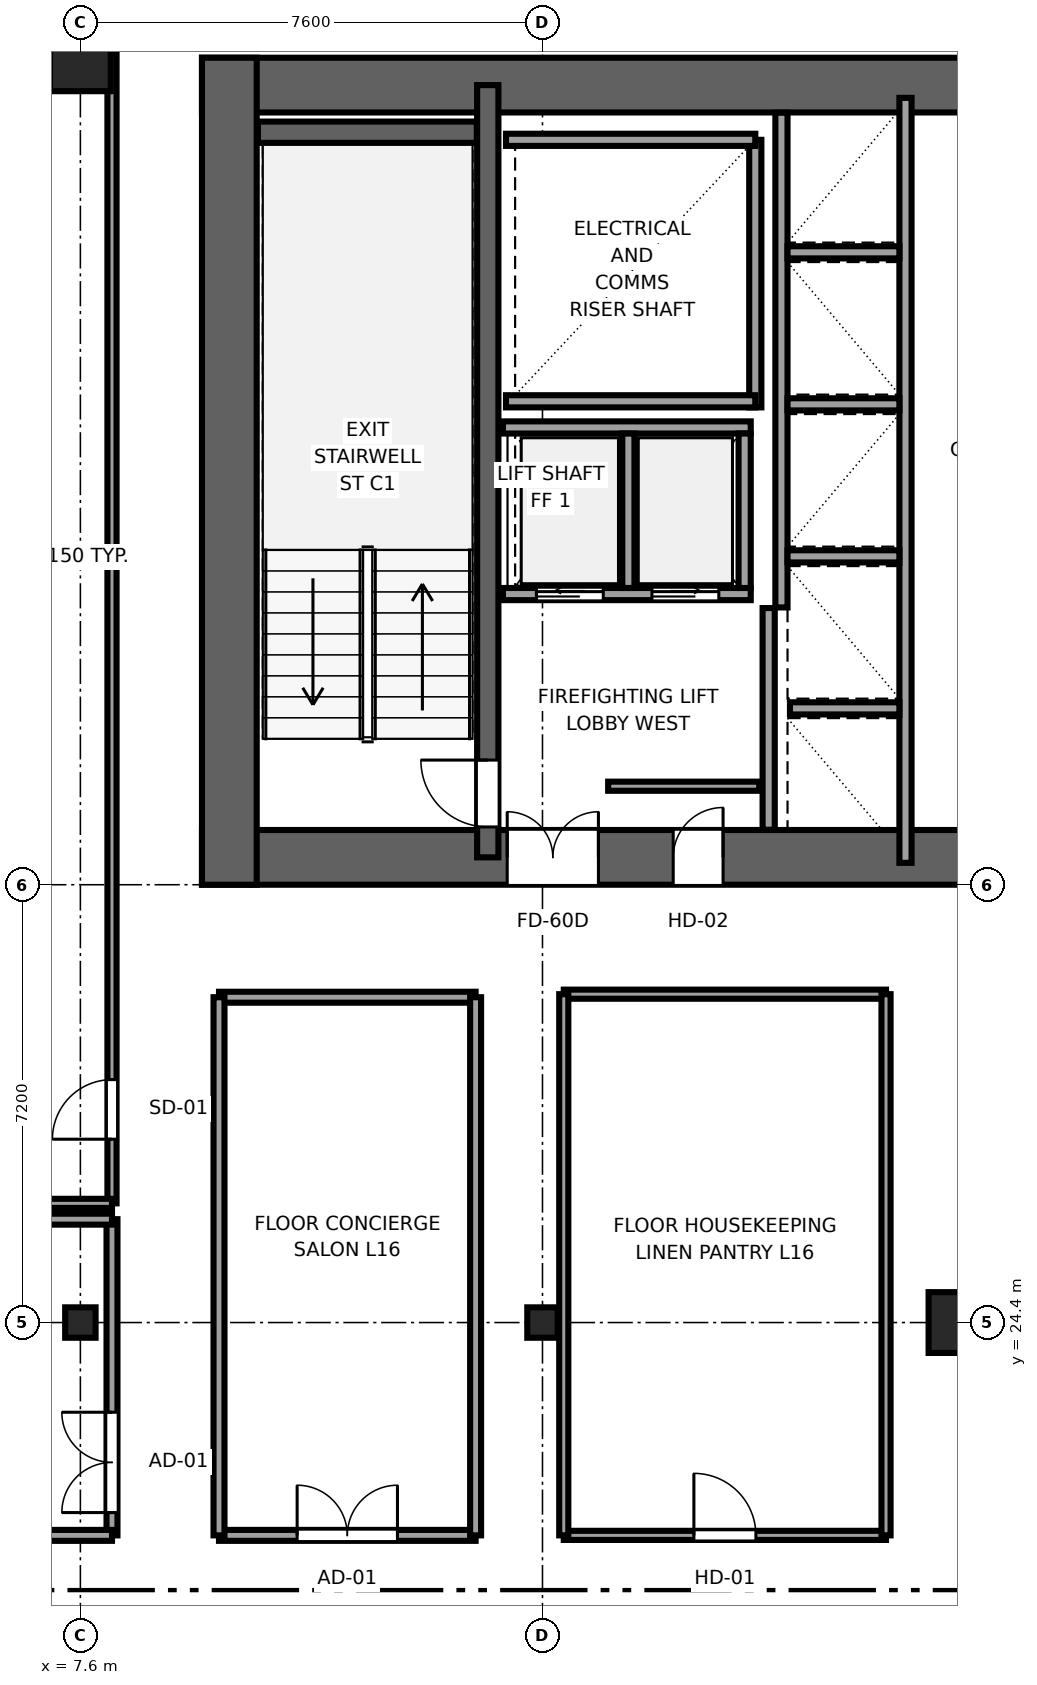
"""IFC4 building model, lengths in metres.
Left out: names, types, materials, properties, quantities, classifications, styles, units other than length and angle.
Written with IfcOpenShell. Run it as: python <this file> out.ifc"""

import sys

from ifc_helpers import new_model, si_unit, direction, frame, frame_2d, origin, origin_2d, place, context, subcontext, project, spatial, rectangle, i_section, extrude, source, transform, mapped, element, fill, save


model = new_model("IFC4")
c1 = context("Model", 3, precision=1e-05, world=origin(), true_north=direction((0.0, 1.0)))
c2 = subcontext(c1, "Body", "Model", "MODEL_VIEW")
j1 = project(units=[si_unit("LENGTHUNIT", "METRE"), si_unit("PLANEANGLEUNIT", "RADIAN")], contexts=[c1])
p1 = place(None, origin())
s1 = spatial("IfcSite", under=j1, at=p1, CompositionType="ELEMENT")
p2 = place(p1, origin())
s2 = spatial("IfcBuilding", under=s1, at=p2, CompositionType="ELEMENT")
p3 = place(p2, frame((0.0, 0.0, 67.5)))
s3 = spatial("IfcBuildingStorey", under=s2, at=p3, CompositionType="ELEMENT", Elevation=67.5)
p4 = place(p3, frame((9.6, 32.05, 0.0), z_axis=(0.0, 0.0, 1.0), x_axis=(1.0, 0.0, 0.0)))
e1 = element("IfcWall", 1, at=p4, inside=s3, PredefinedType="SHEAR", context=c2, shape_type="SweptSolid", body=[
    extrude(rectangle(XDim=26.8, YDim=0.9, at=frame_2d((13.4, 0.0))), origin(), (0.0, 0.0, 1.0), 3.55),
])
p5 = place(p4, frame((6.52, 0.0, 0.0), z_axis=(0.0, 0.0, 1.0), x_axis=(-1.0, 0.0, 0.0)))
e2 = element("IfcOpeningElement", 2, at=p5, cuts=e1, PredefinedType="OPENING", context=c2, shape_type="SweptSolid", body=[
    extrude(rectangle(XDim=1.5, YDim=2.04, at=frame_2d((0.75, 1.02))), frame((0.0, 0.46, 0.0), z_axis=(0.0, -1.0, 0.0), x_axis=(1.0, 0.0, 0.0)), (0.0, 0.0, 1.0), 0.92),
])
p6 = place(p4, frame((14.15, 0.0, 0.0), z_axis=(0.0, 0.0, 1.0), x_axis=(-1.0, 0.0, 0.0)))
e3 = element("IfcOpeningElement", 3, at=p6, cuts=e1, PredefinedType="OPENING", context=c2, shape_type="SweptSolid", body=[
    extrude(rectangle(XDim=1.5, YDim=2.04, at=frame_2d((0.75, 1.02))), frame((0.0, 0.46, 0.0), z_axis=(0.0, -1.0, 0.0), x_axis=(1.0, 0.0, 0.0)), (0.0, 0.0, 1.0), 0.92),
])
p7 = place(p4, frame((20.45, 0.0, 0.0), z_axis=(0.0, 0.0, 1.0), x_axis=(-1.0, 0.0, 0.0)))
e4 = element("IfcOpeningElement", 4, at=p7, cuts=e1, PredefinedType="OPENING", context=c2, shape_type="SweptSolid", body=[
    extrude(rectangle(XDim=1.5, YDim=2.04, at=frame_2d((0.75, 1.02))), frame((0.0, 0.46, 0.0), z_axis=(0.0, -1.0, 0.0), x_axis=(1.0, 0.0, 0.0)), (0.0, 0.0, 1.0), 0.92),
])
p8 = place(p4, frame((8.57, 0.0, 0.0), z_axis=(0.0, 0.0, 1.0), x_axis=(-1.0, 0.0, 0.0)))
e5 = element("IfcOpeningElement", 5, at=p8, cuts=e1, PredefinedType="OPENING", context=c2, shape_type="SweptSolid", body=[
    extrude(rectangle(XDim=0.82, YDim=2.01, at=frame_2d((0.41, 1.005))), frame((0.0, 0.46, 0.0), z_axis=(0.0, -1.0, 0.0), x_axis=(1.0, 0.0, 0.0)), (0.0, 0.0, 1.0), 0.92),
])
p9 = place(p3, frame((9.6, 44.75, 0.0), z_axis=(0.0, 0.0, 1.0), x_axis=(1.0, 0.0, 0.0)))
e6 = element("IfcWall", 6, at=p9, inside=s3, PredefinedType="SHEAR", context=c2, shape_type="SweptSolid", body=[
    extrude(rectangle(XDim=26.8, YDim=0.9, at=frame_2d((13.4, 0.0))), origin(), (0.0, 0.0, 1.0), 3.55),
])
p10 = place(p3, frame((10.05, 31.6, 0.0), z_axis=(0.0, 0.0, 1.0), x_axis=(0.0, 1.0, 0.0)))
e7 = element("IfcWall", 7, at=p10, inside=s3, PredefinedType="SHEAR", context=c2, shape_type="SweptSolid", body=[
    extrude(rectangle(XDim=13.6, YDim=0.9, at=frame_2d((6.8, 0.0))), origin(), (0.0, 0.0, 1.0), 3.55),
])
p11 = place(p3, frame((14.3, 32.05, 0.0), z_axis=(0.0, 0.0, 1.0), x_axis=(0.0, 1.0, 0.0)))
e8 = element("IfcWall", 8, at=p11, inside=s3, PredefinedType="SHEAR", context=c2, shape_type="SweptSolid", body=[
    extrude(rectangle(XDim=12.7, YDim=0.35, at=frame_2d((6.35, 0.0))), origin(), (0.0, 0.0, 1.0), 3.55),
])
p12 = place(p11, frame((0.5, 0.0, 0.0)))
e9 = element("IfcOpeningElement", 9, at=p12, cuts=e8, PredefinedType="OPENING", context=c2, shape_type="SweptSolid", body=[
    extrude(rectangle(XDim=1.1, YDim=2.12, at=frame_2d((0.55, 1.06))), frame((0.0, 0.185, 0.0), z_axis=(0.0, -1.0, 0.0), x_axis=(1.0, 0.0, 0.0)), (0.0, 0.0, 1.0), 0.37),
])
p13 = place(p3, frame((10.52, 43.975, 0.0), z_axis=(0.0, 0.0, 1.0), x_axis=(1.0, 0.0, 0.0)))
e10 = element("IfcWall", 10, at=p13, inside=s3, PredefinedType="SHEAR", context=c2, shape_type="SweptSolid", body=[
    extrude(rectangle(XDim=3.6, YDim=0.35, at=frame_2d((1.8, 0.0))), origin(), (0.0, 0.0, 1.0), 3.55),
])
m1 = source(origin(), c2, "Body", "SweptSolid", [
    extrude(i_section(OverallWidth=0.5, OverallDepth=0.5, WebThickness=0.028, FlangeThickness=0.045, at=origin_2d()), origin(), (0.0, 0.0, 1.0), 3.55),
])
for number, where, z_axis, x_axis in (
    (11, (7.6, 24.4, 0.0), (0.0, 0.0, 1.0), (1.0, 0.0, 0.0)),
    (12, (15.2, 24.4, 0.0), (0.0, 0.0, 1.0), (1.0, 0.0, 0.0)),
):
    element("IfcColumn", number, at=place(p3, frame(where, z_axis=z_axis, x_axis=x_axis)), inside=s3, PredefinedType="COLUMN", context=c2, shape_type="MappedRepresentation", body=[
        mapped(m1, transform((0.0, 0.0, 0.0), x_axis=(1.0, 0.0, 0.0), y_axis=(0.0, 1.0, 0.0), z_axis=(0.0, 0.0, 1.0), scale=1.0)),
    ])
m2 = source(origin(), c2, "Body", "SweptSolid", [
    extrude(rectangle(XDim=1.0, YDim=1.0, at=origin_2d()), origin(), (0.0, 0.0, 1.0), 3.55),
])
for number, where, z_axis, x_axis in (
    (13, (22.05, 24.4, 0.0), (0.0, 0.0, 1.0), (1.0, 0.0, 0.0)),
    (14, (7.6, 45.15, 0.0), (0.0, 0.0, 1.0), (1.0, 0.0, 0.0)),
):
    element("IfcColumn", number, at=place(p3, frame(where, z_axis=z_axis, x_axis=x_axis)), inside=s3, PredefinedType="COLUMN", context=c2, shape_type="MappedRepresentation", body=[
        mapped(m2, transform((0.0, 0.0, 0.0), x_axis=(1.0, 0.0, 0.0), y_axis=(0.0, 1.0, 0.0), z_axis=(0.0, 0.0, 1.0), scale=1.0)),
    ])
p14 = place(p3, frame((18.7, 39.45, 0.0), z_axis=(0.0, 0.0, 1.0), x_axis=(0.0, 1.0, 0.0)))
e15 = element("IfcWall", 15, at=p14, inside=s3, PredefinedType="SOLIDWALL", context=c2, shape_type="SweptSolid", body=[
    extrude(rectangle(XDim=4.4, YDim=0.2, at=frame_2d((2.2, 0.0))), origin(), (0.0, 0.0, 1.0), 3.37),
])
for number, where, z_axis, x_axis in (
    (16, (14.6, 39.55, 0.0), (0.0, 0.0, 1.0), (1.0, 0.0, 0.0)),
    (17, (14.6, 43.85, 0.0), (0.0, 0.0, 1.0), (1.0, 0.0, 0.0)),
):
    element("IfcWall", number, at=place(p3, frame(where, z_axis=z_axis, x_axis=x_axis)), inside=s3, PredefinedType="SOLIDWALL", context=c2, shape_type="SweptSolid", body=[
        extrude(rectangle(XDim=4.1, YDim=0.2, at=frame_2d((2.05, 0.0))), origin(), (0.0, 0.0, 1.0), 3.37),
    ])
p15 = place(p3, frame((18.92, 32.504, 0.0), z_axis=(0.0, 0.0, 1.0), x_axis=(0.0, 1.0, 0.0)))
e18 = element("IfcWall", 18, at=p15, inside=s3, PredefinedType="SOLIDWALL", context=c2, shape_type="SweptSolid", body=[
    extrude(rectangle(XDim=3.646, YDim=0.2, at=frame_2d((1.823, 0.0))), origin(), (0.0, 0.0, 1.0), 3.37),
])
p16 = place(p3, frame((21.17, 31.96, 0.0), z_axis=(0.0, 0.0, 1.0), x_axis=(0.0, 1.0, 0.0)))
e19 = element("IfcWall", 19, at=p16, inside=s3, PredefinedType="SOLIDWALL", context=c2, shape_type="SweptSolid", body=[
    extrude(rectangle(XDim=12.58, YDim=0.2, at=frame_2d((6.29, 0.0))), origin(), (0.0, 0.0, 1.0), 3.37),
])
p17 = place(p3, frame((19.13, 36.16, 0.0), z_axis=(0.0, 0.0, 1.0), x_axis=(0.0, 1.0, 0.0)))
e20 = element("IfcWall", 20, at=p17, inside=s3, PredefinedType="SOLIDWALL", context=c2, shape_type="SweptSolid", body=[
    extrude(rectangle(XDim=8.136, YDim=0.2, at=frame_2d((4.068, 0.0))), origin(), (0.0, 0.0, 1.0), 3.37),
])
p18 = place(p3, frame((19.27, 34.5, 0.0), z_axis=(0.0, 0.0, 1.0), x_axis=(1.0, 0.0, 0.0)))
e21 = element("IfcWall", 21, at=p18, inside=s3, PredefinedType="SOLIDWALL", context=c2, shape_type="SweptSolid", body=[
    extrude(rectangle(XDim=1.8, YDim=0.2, at=frame_2d((0.9, 0.0))), origin(), (0.0, 0.0, 1.0), 3.37),
])
for number, where, z_axis, x_axis in (
    (22, (19.23, 37.0, 0.0), (0.0, 0.0, 1.0), (1.0, 0.0, 0.0)),
    (23, (19.23, 39.5, 0.0), (0.0, 0.0, 1.0), (1.0, 0.0, 0.0)),
    (24, (19.23, 42.0, 0.0), (0.0, 0.0, 1.0), (1.0, 0.0, 0.0)),
):
    element("IfcWall", number, at=place(p3, frame(where, z_axis=z_axis, x_axis=x_axis)), inside=s3, PredefinedType="SOLIDWALL", context=c2, shape_type="SweptSolid", body=[
        extrude(rectangle(XDim=1.84, YDim=0.2, at=frame_2d((0.92, 0.0))), origin(), (0.0, 0.0, 1.0), 3.37),
    ])
p19 = place(p3, frame((14.55, 36.38, 0.0), z_axis=(0.0, 0.0, 1.0), x_axis=(1.0, 0.0, 0.0)))
e25 = element("IfcWall", 25, at=p19, inside=s3, PredefinedType="SOLIDWALL", context=c2, shape_type="SweptSolid", body=[
    extrude(rectangle(XDim=4.075, YDim=0.2, at=frame_2d((2.038, 0.0))), origin(), (0.0, 0.0, 1.0), 3.37),
])
p20 = place(p19, frame((0.55, 0.0, 0.0)))
e26 = element("IfcOpeningElement", 26, at=p20, cuts=e25, PredefinedType="OPENING", context=c2, shape_type="SweptSolid", body=[
    extrude(rectangle(XDim=1.1, YDim=2.12, at=frame_2d((0.55, 1.06))), frame((0.0, 0.11, 0.0), z_axis=(0.0, -1.0, 0.0), x_axis=(1.0, 0.0, 0.0)), (0.0, 0.0, 1.0), 0.22),
])
p21 = place(p19, frame((2.45, 0.0, 0.0)))
e27 = element("IfcOpeningElement", 27, at=p21, cuts=e25, PredefinedType="OPENING", context=c2, shape_type="SweptSolid", body=[
    extrude(rectangle(XDim=1.1, YDim=2.12, at=frame_2d((0.55, 1.06))), frame((0.0, 0.11, 0.0), z_axis=(0.0, -1.0, 0.0), x_axis=(1.0, 0.0, 0.0)), (0.0, 0.0, 1.0), 0.22),
])
p22 = place(p3, frame((14.55, 39.12, 0.0), z_axis=(0.0, 0.0, 1.0), x_axis=(1.0, 0.0, 0.0)))
e28 = element("IfcWall", 28, at=p22, inside=s3, PredefinedType="SOLIDWALL", context=c2, shape_type="SweptSolid", body=[
    extrude(rectangle(XDim=4.075, YDim=0.2, at=frame_2d((2.038, 0.0))), origin(), (0.0, 0.0, 1.0), 3.37),
])
for number, where, z_axis, x_axis in (
    (29, (18.525, 36.48, 0.0), (0.0, 0.0, 1.0), (0.0, 1.0, 0.0)),
    (30, (16.613, 36.48, 0.0), (0.0, 0.0, 1.0), (0.0, 1.0, 0.0)),
):
    element("IfcWall", number, at=place(p3, frame(where, z_axis=z_axis, x_axis=x_axis)), inside=s3, PredefinedType="SOLIDWALL", context=c2, shape_type="SweptSolid", body=[
        extrude(rectangle(XDim=2.54, YDim=0.2, at=frame_2d((1.27, 0.0))), origin(), (0.0, 0.0, 1.0), 3.37),
    ])
p23 = place(p3, frame((16.28, 33.22, 0.0), z_axis=(0.0, 0.0, 1.0), x_axis=(1.0, 0.0, 0.0)))
e31 = element("IfcWall", 31, at=p23, inside=s3, PredefinedType="PARTITIONING", context=c2, shape_type="SweptSolid", body=[
    extrude(rectangle(XDim=2.485, YDim=0.15, at=frame_2d((1.242, 0.0))), origin(), (0.0, 0.0, 1.0), 3.37),
])
p24 = place(p3, frame((8.12, 20.9, 0.0), z_axis=(0.0, 0.0, 1.0), x_axis=(0.0, 1.0, 0.0)))
e32 = element("IfcWall", 32, at=p24, inside=s3, PredefinedType="PARTITIONING", context=c2, shape_type="SweptSolid", body=[
    extrude(rectangle(XDim=5.2, YDim=0.18, at=frame_2d((2.6, 0.0))), origin(), (0.0, 0.0, 1.0), 3.37),
])
p25 = place(p24, frame((0.375, 0.0, 0.0)))
e33 = element("IfcOpeningElement", 33, at=p25, cuts=e32, PredefinedType="OPENING", context=c2, shape_type="SweptSolid", body=[
    extrude(rectangle(XDim=1.65, YDim=2.15, at=frame_2d((0.825, 1.075))), frame((0.0, 0.1, 0.0), z_axis=(0.0, -1.0, 0.0), x_axis=(1.0, 0.0, 0.0)), (0.0, 0.0, 1.0), 0.2),
])
for number, where, z_axis, x_axis in (
    (34, (0.405, 20.9, 0.0), (0.0, 0.0, 1.0), (1.0, 0.0, 0.0)),
    (35, (0.405, 26.1, 0.0), (0.0, 0.0, 1.0), (1.0, 0.0, 0.0)),
):
    element("IfcWall", number, at=place(p3, frame(where, z_axis=z_axis, x_axis=x_axis)), inside=s3, PredefinedType="PARTITIONING", context=c2, shape_type="SweptSolid", body=[
        extrude(rectangle(XDim=7.715, YDim=0.18, at=frame_2d((3.857, 0.0))), origin(), (0.0, 0.0, 1.0), 3.37),
    ])
p26 = place(p3, frame((8.12, 26.36, 0.0), z_axis=(0.0, 0.0, 1.0), x_axis=(0.0, 1.0, 0.0)))
e36 = element("IfcWall", 36, at=p26, inside=s3, PredefinedType="PARTITIONING", context=c2, shape_type="SweptSolid", body=[
    extrude(rectangle(XDim=19.235, YDim=0.15, at=frame_2d((9.617, 0.0))), origin(), (0.0, 0.0, 1.0), 3.37),
])
p27 = place(p26, frame((1.055, 0.0, 0.0)))
e37 = element("IfcOpeningElement", 37, at=p27, cuts=e36, PredefinedType="OPENING", context=c2, shape_type="SweptSolid", body=[
    extrude(rectangle(XDim=0.98, YDim=2.12, at=frame_2d((0.49, 1.06))), frame((0.0, 0.085, 0.0), z_axis=(0.0, -1.0, 0.0), x_axis=(1.0, 0.0, 0.0)), (0.0, 0.0, 1.0), 0.17),
])
p28 = place(p3, frame((2.77, 26.36, 0.0), z_axis=(0.0, 0.0, 1.0), x_axis=(1.0, 0.0, 0.0)))
e38 = element("IfcWall", 38, at=p28, inside=s3, PredefinedType="PARTITIONING", context=c2, shape_type="SweptSolid", body=[
    extrude(rectangle(XDim=5.35, YDim=0.15, at=frame_2d((2.675, 0.0))), origin(), (0.0, 0.0, 1.0), 3.37),
])
p29 = place(p3, frame((9.88, 20.9, 0.0), z_axis=(0.0, 0.0, 1.0), x_axis=(1.0, 0.0, 0.0)))
e39 = element("IfcWall", 39, at=p29, inside=s3, PredefinedType="PARTITIONING", context=c2, shape_type="SweptSolid", body=[
    extrude(rectangle(XDim=4.22, YDim=0.18, at=frame_2d((2.11, 0.0))), origin(), (0.0, 0.0, 1.0), 3.37),
])
p30 = place(p29, frame((1.285, 0.0, 0.0)))
e40 = element("IfcOpeningElement", 40, at=p30, cuts=e39, PredefinedType="OPENING", context=c2, shape_type="SweptSolid", body=[
    extrude(rectangle(XDim=1.65, YDim=2.15, at=frame_2d((0.825, 1.075))), frame((0.0, 0.1, 0.0), z_axis=(0.0, -1.0, 0.0), x_axis=(1.0, 0.0, 0.0)), (0.0, 0.0, 1.0), 0.2),
])
p31 = place(p3, frame((9.88, 29.75, 0.0), z_axis=(0.0, 0.0, 1.0), x_axis=(1.0, 0.0, 0.0)))
e41 = element("IfcWall", 41, at=p31, inside=s3, PredefinedType="PARTITIONING", context=c2, shape_type="SweptSolid", body=[
    extrude(rectangle(XDim=4.22, YDim=0.18, at=frame_2d((2.11, 0.0))), origin(), (0.0, 0.0, 1.0), 3.37),
])
for number, where, z_axis, x_axis in (
    (42, (9.88, 20.9, 0.0), (0.0, 0.0, 1.0), (0.0, 1.0, 0.0)),
    (43, (14.1, 20.9, 0.0), (0.0, 0.0, 1.0), (0.0, 1.0, 0.0)),
):
    element("IfcWall", number, at=place(p3, frame(where, z_axis=z_axis, x_axis=x_axis)), inside=s3, PredefinedType="PARTITIONING", context=c2, shape_type="SweptSolid", body=[
        extrude(rectangle(XDim=8.85, YDim=0.18, at=frame_2d((4.425, 0.0))), origin(), (0.0, 0.0, 1.0), 3.37),
    ])
p32 = place(p3, frame((15.55, 20.9, 0.0), z_axis=(0.0, 0.0, 1.0), x_axis=(1.0, 0.0, 0.0)))
e44 = element("IfcWall", 44, at=p32, inside=s3, PredefinedType="PARTITIONING", context=c2, shape_type="SweptSolid", body=[
    extrude(rectangle(XDim=5.3, YDim=0.15, at=frame_2d((2.65, 0.0))), origin(), (0.0, 0.0, 1.0), 3.37),
])
p33 = place(p32, frame((2.14, 0.0, 0.0)))
e45 = element("IfcOpeningElement", 45, at=p33, cuts=e44, PredefinedType="OPENING", context=c2, shape_type="SweptSolid", body=[
    extrude(rectangle(XDim=1.02, YDim=2.03, at=frame_2d((0.51, 1.015))), frame((0.0, 0.085, 0.0), z_axis=(0.0, -1.0, 0.0), x_axis=(1.0, 0.0, 0.0)), (0.0, 0.0, 1.0), 0.17),
])
p34 = place(p3, frame((15.55, 29.8, 0.0), z_axis=(0.0, 0.0, 1.0), x_axis=(1.0, 0.0, 0.0)))
e46 = element("IfcWall", 46, at=p34, inside=s3, PredefinedType="PARTITIONING", context=c2, shape_type="SweptSolid", body=[
    extrude(rectangle(XDim=5.3, YDim=0.15, at=frame_2d((2.65, 0.0))), origin(), (0.0, 0.0, 1.0), 3.37),
])
for number, where, z_axis, x_axis in (
    (47, (15.55, 20.9, 0.0), (0.0, 0.0, 1.0), (0.0, 1.0, 0.0)),
    (48, (20.85, 20.9, 0.0), (0.0, 0.0, 1.0), (0.0, 1.0, 0.0)),
):
    element("IfcWall", number, at=place(p3, frame(where, z_axis=z_axis, x_axis=x_axis)), inside=s3, PredefinedType="PARTITIONING", context=c2, shape_type="SweptSolid", body=[
        extrude(rectangle(XDim=8.9, YDim=0.15, at=frame_2d((4.45, 0.0))), origin(), (0.0, 0.0, 1.0), 3.37),
    ])
m3 = source(origin(), c2, "Body", "SweptSolid", [
    extrude(rectangle(XDim=1.1, YDim=2.12, at=frame_2d((0.55, 1.06))), frame((0.0, 0.025, 0.0), z_axis=(0.0, -1.0, 0.0), x_axis=(1.0, 0.0, 0.0)), (0.0, 0.0, 1.0), 0.05),
])
p35 = place(p12, origin())
e49 = element("IfcDoor", 49, at=p35, inside=s3, OperationType="SINGLE_SWING_RIGHT", PredefinedType="DOOR", context=c2, shape_type="MappedRepresentation", body=[
    mapped(m3, transform((0.0, 0.0, 0.0), x_axis=(1.0, 0.0, 0.0), y_axis=(0.0, 1.0, 0.0), z_axis=(0.0, 0.0, 1.0), scale=1.0)),
])
fill(e9, e49)
m4 = source(origin(), c2, "Body", "SweptSolid", [
    extrude(rectangle(XDim=1.5, YDim=2.04, at=frame_2d((0.75, 1.02))), frame((0.0, 0.025, 0.0), z_axis=(0.0, -1.0, 0.0), x_axis=(1.0, 0.0, 0.0)), (0.0, 0.0, 1.0), 0.05),
])
p36 = place(p5, origin())
e50 = element("IfcDoor", 50, at=p36, inside=s3, OperationType="DOUBLE_DOOR_SINGLE_SWING", PredefinedType="DOOR", context=c2, shape_type="MappedRepresentation", body=[
    mapped(m4, transform((0.0, 0.0, 0.0), x_axis=(1.0, 0.0, 0.0), y_axis=(0.0, 1.0, 0.0), z_axis=(0.0, 0.0, 1.0), scale=1.0)),
])
fill(e2, e50)
m5 = source(origin(), c2, "Body", "SweptSolid", [
    extrude(rectangle(XDim=0.82, YDim=2.01, at=frame_2d((0.41, 1.005))), frame((0.0, 0.025, 0.0), z_axis=(0.0, -1.0, 0.0), x_axis=(1.0, 0.0, 0.0)), (0.0, 0.0, 1.0), 0.05),
])
p37 = place(p8, origin())
e51 = element("IfcDoor", 51, at=p37, inside=s3, OperationType="SINGLE_SWING_RIGHT", PredefinedType="DOOR", context=c2, shape_type="MappedRepresentation", body=[
    mapped(m5, transform((0.0, 0.0, 0.0), x_axis=(1.0, 0.0, 0.0), y_axis=(0.0, 1.0, 0.0), z_axis=(0.0, 0.0, 1.0), scale=1.0)),
])
fill(e5, e51)
m6 = source(origin(), c2, "Body", "SweptSolid", [
    extrude(rectangle(XDim=1.1, YDim=2.12, at=frame_2d((0.55, 1.06))), frame((0.0, 0.025, 0.0), z_axis=(0.0, -1.0, 0.0), x_axis=(1.0, 0.0, 0.0)), (0.0, 0.0, 1.0), 0.05),
])
p38 = place(p20, origin())
e52 = element("IfcDoor", 52, at=p38, inside=s3, OperationType="SLIDING_TO_LEFT", PredefinedType="DOOR", context=c2, shape_type="MappedRepresentation", body=[
    mapped(m6, transform((0.0, 0.0, 0.0), x_axis=(1.0, 0.0, 0.0), y_axis=(0.0, 1.0, 0.0), z_axis=(0.0, 0.0, 1.0), scale=1.0)),
])
fill(e26, e52)
p39 = place(p21, origin())
e53 = element("IfcDoor", 53, at=p39, inside=s3, OperationType="SLIDING_TO_RIGHT", PredefinedType="DOOR", context=c2, shape_type="MappedRepresentation", body=[
    mapped(m6, transform((0.0, 0.0, 0.0), x_axis=(1.0, 0.0, 0.0), y_axis=(0.0, 1.0, 0.0), z_axis=(0.0, 0.0, 1.0), scale=1.0)),
])
fill(e27, e53)
m7 = source(origin(), c2, "Body", "SweptSolid", [
    extrude(rectangle(XDim=1.65, YDim=2.15, at=frame_2d((0.825, 1.075))), frame((0.0, 0.025, 0.0), z_axis=(0.0, -1.0, 0.0), x_axis=(1.0, 0.0, 0.0)), (0.0, 0.0, 1.0), 0.05),
])
p40 = place(p25, origin())
e54 = element("IfcDoor", 54, at=p40, inside=s3, OperationType="DOUBLE_DOOR_SINGLE_SWING", PredefinedType="DOOR", context=c2, shape_type="MappedRepresentation", body=[
    mapped(m7, transform((0.0, 0.0, 0.0), x_axis=(1.0, 0.0, 0.0), y_axis=(0.0, 1.0, 0.0), z_axis=(0.0, 0.0, 1.0), scale=1.0)),
])
fill(e33, e54)
m8 = source(origin(), c2, "Body", "SweptSolid", [
    extrude(rectangle(XDim=0.98, YDim=2.12, at=frame_2d((0.49, 1.06))), frame((0.0, 0.025, 0.0), z_axis=(0.0, -1.0, 0.0), x_axis=(1.0, 0.0, 0.0)), (0.0, 0.0, 1.0), 0.05),
])
p41 = place(p27, origin())
e55 = element("IfcDoor", 55, at=p41, inside=s3, OperationType="SINGLE_SWING_LEFT", PredefinedType="DOOR", context=c2, shape_type="MappedRepresentation", body=[
    mapped(m8, transform((0.0, 0.0, 0.0), x_axis=(1.0, 0.0, 0.0), y_axis=(0.0, 1.0, 0.0), z_axis=(0.0, 0.0, 1.0), scale=1.0)),
])
fill(e37, e55)
p42 = place(p30, origin())
e56 = element("IfcDoor", 56, at=p42, inside=s3, OperationType="DOUBLE_DOOR_SINGLE_SWING", PredefinedType="DOOR", context=c2, shape_type="MappedRepresentation", body=[
    mapped(m7, transform((0.0, 0.0, 0.0), x_axis=(1.0, 0.0, 0.0), y_axis=(0.0, 1.0, 0.0), z_axis=(0.0, 0.0, 1.0), scale=1.0)),
])
fill(e40, e56)
m9 = source(origin(), c2, "Body", "SweptSolid", [
    extrude(rectangle(XDim=1.02, YDim=2.03, at=frame_2d((0.51, 1.015))), frame((0.0, 0.025, 0.0), z_axis=(0.0, -1.0, 0.0), x_axis=(1.0, 0.0, 0.0)), (0.0, 0.0, 1.0), 0.05),
])
p43 = place(p33, origin())
e57 = element("IfcDoor", 57, at=p43, inside=s3, OperationType="SINGLE_SWING_LEFT", PredefinedType="DOOR", context=c2, shape_type="MappedRepresentation", body=[
    mapped(m9, transform((0.0, 0.0, 0.0), x_axis=(1.0, 0.0, 0.0), y_axis=(0.0, 1.0, 0.0), z_axis=(0.0, 0.0, 1.0), scale=1.0)),
])
fill(e45, e57)
save(model, sys.argv[1])
